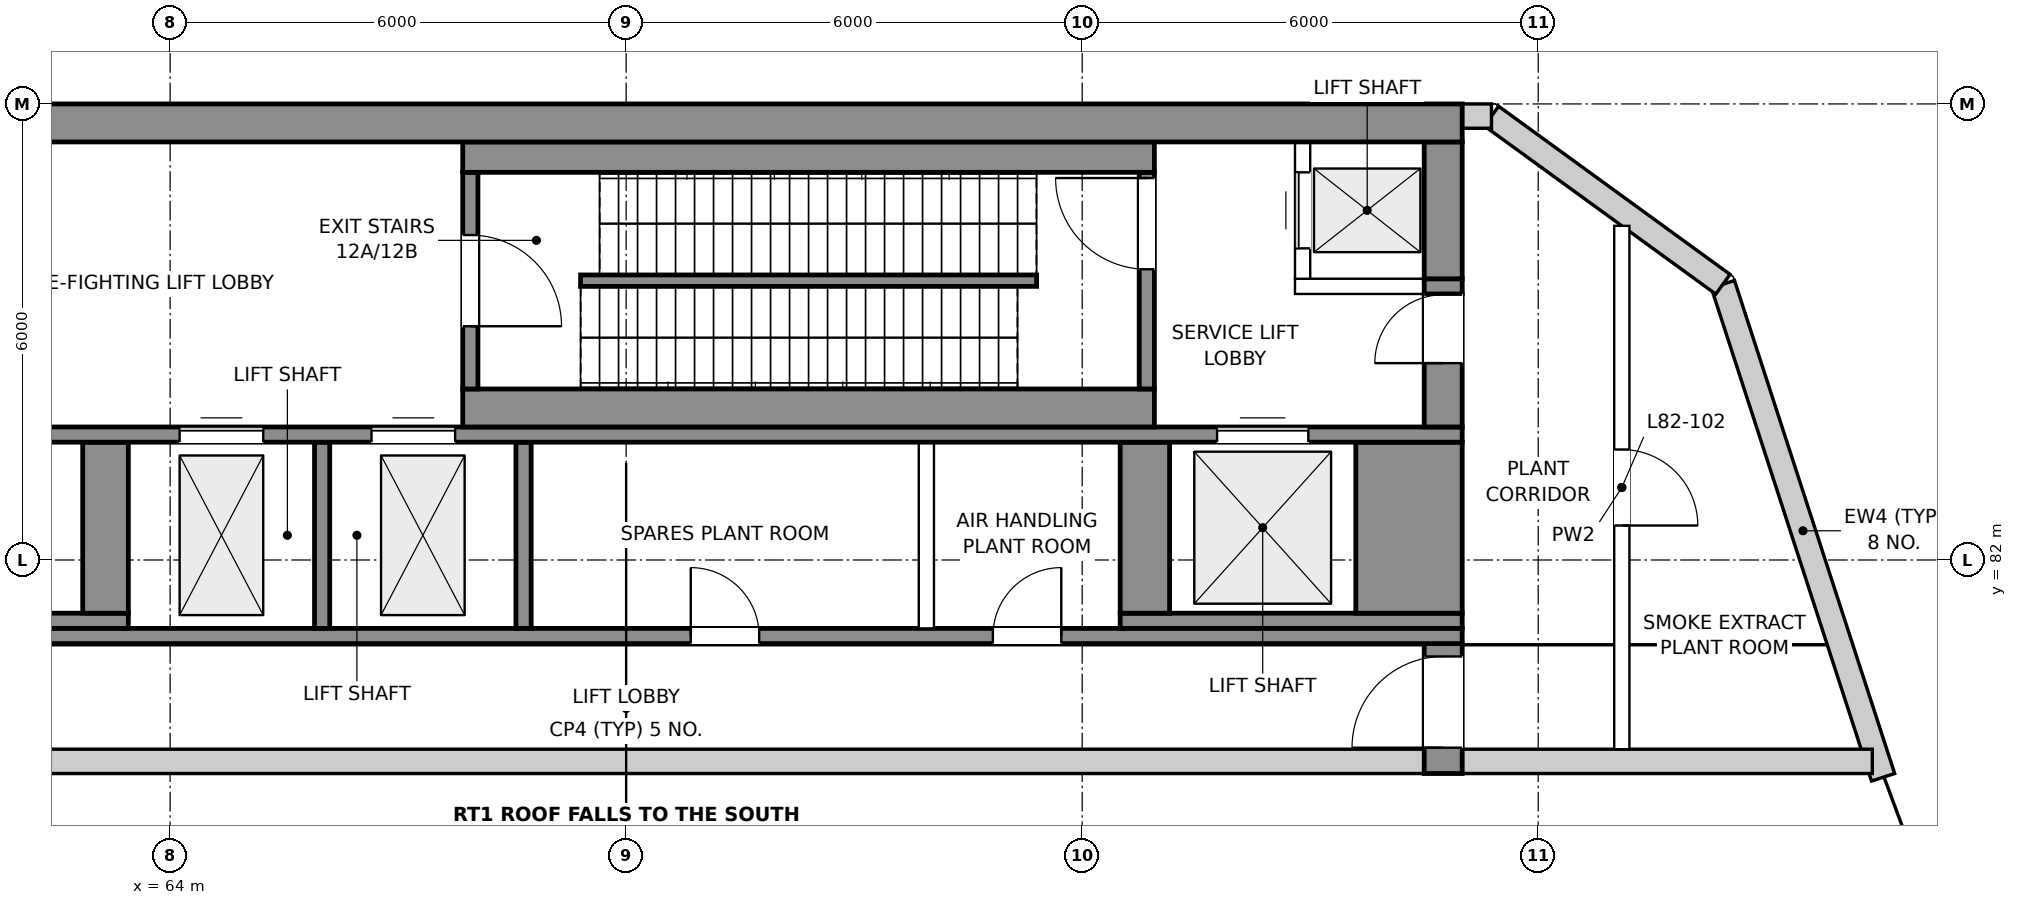
"""IFC4 building model, lengths in metres.
Left out: names, types, materials, properties, quantities, classifications, styles, units other than length and angle.
Written with IfcOpenShell. Run it as: python <this file> out.ifc"""

import sys

from ifc_helpers import new_model, si_unit, direction, frame, frame_2d, origin, place, context, subcontext, project, spatial, polyline, rectangle, outline, extrude, element, fill, save


model = new_model("IFC4")
c1 = context("Model", 3, precision=1e-05, world=origin(), true_north=direction((0.0, 1.0)))
c2 = subcontext(c1, "Body", "Model", "MODEL_VIEW")
j1 = project(units=[si_unit("LENGTHUNIT", "METRE"), si_unit("PLANEANGLEUNIT", "RADIAN")], contexts=[c1])
p1 = place(None, origin())
s1 = spatial("IfcSite", under=j1, at=p1, CompositionType="ELEMENT")
p2 = place(p1, origin())
s2 = spatial("IfcBuilding", under=s1, at=p2, CompositionType="ELEMENT")
p3 = place(p2, frame((0.0, 0.0, 351.2)))
s3 = spatial("IfcBuildingStorey", under=s2, at=p3, CompositionType="ELEMENT", Elevation=351.2)
p4 = place(p3, frame((86.538, 79.141, 0.0), z_axis=(0.0, 0.0, 1.0), x_axis=(-0.309001889909, 0.951061423901, 0.0)))
e1 = element("IfcWall", 1, at=p4, inside=s3, PredefinedType="SOLIDWALL", context=c2, shape_type="SweptSolid", body=[
    extrude(outline(polyline([(0.0, 0.0), (6.82, 0.0), (6.82, 4.2), (1.833, 4.2), (0.0, 2.656), (0.0, 0.0)])), frame((0.0, 0.16, 0.0), z_axis=(0.0, -1.0, 0.0), x_axis=(1.0, 0.0, 0.0)), (0.0, 0.0, 1.0), 0.32),
])
p5 = place(p3, frame((84.43, 85.628, 0.0), z_axis=(0.0, 0.0, 1.0), x_axis=(-0.809022082061, 0.58777824963, 0.0)))
e2 = element("IfcWall", 2, at=p5, inside=s3, PredefinedType="SOLIDWALL", context=c2, shape_type="SweptSolid", body=[
    extrude(rectangle(XDim=3.764, YDim=0.32, at=frame_2d((1.882, 0.0))), origin(), (0.0, 0.0, 1.0), 4.2),
])
p6 = place(p3, frame((81.385, 87.84, 0.0), z_axis=(0.0, 0.0, 1.0), x_axis=(-1.0, 0.0, 0.0)))
e3 = element("IfcWall", 3, at=p6, inside=s3, PredefinedType="SOLIDWALL", context=c2, shape_type="SweptSolid", body=[
    extrude(rectangle(XDim=0.385, YDim=0.32, at=frame_2d((0.192, 0.0))), origin(), (0.0, 0.0, 1.0), 4.2),
])
p7 = place(p3, frame((59.5, 79.351, 0.0), z_axis=(0.0, 0.0, 1.0), x_axis=(1.0, 0.0, 0.0)))
e4 = element("IfcWall", 4, at=p7, inside=s3, PredefinedType="SOLIDWALL", context=c2, shape_type="SweptSolid", body=[
    extrude(rectangle(XDim=21.0, YDim=0.32, at=frame_2d((10.5, 0.0))), origin(), (0.0, 0.0, 1.0), 2.842),
])
p8 = place(p3, frame((81.0, 79.351, 0.0), z_axis=(0.0, 0.0, 1.0), x_axis=(1.0, 0.0, 0.0)))
e5 = element("IfcWall", 5, at=p8, inside=s3, PredefinedType="SOLIDWALL", context=c2, shape_type="SweptSolid", body=[
    extrude(rectangle(XDim=5.396, YDim=0.32, at=frame_2d((2.698, 0.0))), origin(), (0.0, 0.0, 1.0), 2.842),
])
p9 = place(p3, frame((80.75, 79.191, 0.0), z_axis=(0.0, 0.0, 1.0), x_axis=(0.0, 1.0, 0.0)))
e6 = element("IfcWall", 6, at=p9, inside=s3, PredefinedType="SHEAR", context=c2, shape_type="SweptSolid", body=[
    extrude(outline(polyline([(0.0, 0.0), (1.709, 0.0), (1.709, 4.163), (0.0, 2.65), (0.0, 0.0)])), frame((0.0, 0.25, 0.0), z_axis=(0.0, -1.0, 0.0), x_axis=(1.0, 0.0, 0.0)), (0.0, 0.0, 1.0), 0.5),
])
p10 = place(p9, frame((0.34, 0.0, 0.0)))
e7 = element("IfcOpeningElement", 7, at=p10, cuts=e6, PredefinedType="OPENING", context=c2, shape_type="SweptSolid", body=[
    extrude(rectangle(XDim=1.2, YDim=2.1, at=frame_2d((0.6, 1.05))), frame((0.0, 0.26, 0.0), z_axis=(0.0, -1.0, 0.0), x_axis=(1.0, 0.0, 0.0)), (0.0, 0.0, 1.0), 0.52),
])
p11 = place(p3, frame((59.0, 81.0, 0.0), z_axis=(0.0, 0.0, 1.0), x_axis=(1.0, 0.0, 0.0)))
e8 = element("IfcWall", 8, at=p11, inside=s3, PredefinedType="SHEAR", context=c2, shape_type="SweptSolid", body=[
    extrude(rectangle(XDim=22.0, YDim=0.2, at=frame_2d((11.0, 0.0))), origin(), (0.0, 0.0, 1.0), 4.252),
])
p12 = place(p11, frame((11.85, 0.0, 0.0)))
e9 = element("IfcOpeningElement", 9, at=p12, cuts=e8, PredefinedType="OPENING", context=c2, shape_type="SweptSolid", body=[
    extrude(rectangle(XDim=0.9, YDim=2.1, at=frame_2d((0.45, 1.05))), frame((0.0, 0.11, 0.0), z_axis=(0.0, -1.0, 0.0), x_axis=(1.0, 0.0, 0.0)), (0.0, 0.0, 1.0), 0.22),
])
p13 = place(p11, frame((15.825, 0.0, 0.0)))
e10 = element("IfcOpeningElement", 10, at=p13, cuts=e8, PredefinedType="OPENING", context=c2, shape_type="SweptSolid", body=[
    extrude(rectangle(XDim=0.9, YDim=2.1, at=frame_2d((0.45, 1.05))), frame((0.0, 0.11, 0.0), z_axis=(0.0, -1.0, 0.0), x_axis=(1.0, 0.0, 0.0)), (0.0, 0.0, 1.0), 0.22),
])
p14 = place(p3, frame((59.0, 81.2, 0.0), z_axis=(0.0, 0.0, 1.0), x_axis=(1.0, 0.0, 0.0)))
e11 = element("IfcWall", 11, at=p14, inside=s3, PredefinedType="SHEAR", context=c2, shape_type="SweptSolid", body=[
    extrude(rectangle(XDim=4.45, YDim=0.2, at=frame_2d((2.225, 0.0))), origin(), (0.0, 0.0, 1.0), 4.429),
])
for number, where, z_axis, x_axis in (
    (12, (66.0, 81.1, 0.0), (0.0, 0.0, 1.0), (0.0, 1.0, 0.0)),
    (13, (68.65, 81.1, 0.0), (0.0, 0.0, 1.0), (0.0, 1.0, 0.0)),
):
    element("IfcWall", number, at=place(p3, frame(where, z_axis=z_axis, x_axis=x_axis)), inside=s3, PredefinedType="SHEAR", context=c2, shape_type="SweptSolid", body=[
        extrude(outline(polyline([(0.0, 0.0), (2.45, 0.0), (2.45, 4.5), (0.0, 4.341), (0.0, 0.0)])), frame((0.0, 0.1, 0.0), z_axis=(0.0, -1.0, 0.0), x_axis=(1.0, 0.0, 0.0)), (0.0, 0.0, 1.0), 0.2),
    ])
p15 = place(p3, frame((73.95, 81.1, 0.0), z_axis=(0.0, 0.0, 1.0), x_axis=(0.0, 1.0, 0.0)))
e14 = element("IfcWall", 14, at=p15, inside=s3, PredefinedType="PARTITIONING", context=c2, shape_type="SweptSolid", body=[
    extrude(rectangle(XDim=2.45, YDim=0.2, at=frame_2d((1.225, 0.0))), origin(), (0.0, 0.0, 1.0), 4.2),
])
p16 = place(p3, frame((76.5, 81.2, 0.0), z_axis=(0.0, 0.0, 1.0), x_axis=(1.0, 0.0, 0.0)))
e15 = element("IfcWall", 15, at=p16, inside=s3, PredefinedType="SHEAR", context=c2, shape_type="SweptSolid", body=[
    extrude(rectangle(XDim=4.5, YDim=0.2, at=frame_2d((2.25, 0.0))), origin(), (0.0, 0.0, 1.0), 4.429),
])
p17 = place(p3, frame((63.15, 81.3, 0.0), z_axis=(0.0, 0.0, 1.0), x_axis=(0.0, 1.0, 0.0)))
e16 = element("IfcWall", 16, at=p17, inside=s3, PredefinedType="SHEAR", context=c2, shape_type="SweptSolid", body=[
    extrude(rectangle(XDim=2.25, YDim=0.6, at=frame_2d((1.125, 0.0))), origin(), (0.0, 0.0, 1.0), 4.5),
])
p18 = place(p3, frame((76.825, 81.3, 0.0), z_axis=(0.0, 0.0, 1.0), x_axis=(0.0, 1.0, 0.0)))
e17 = element("IfcWall", 17, at=p18, inside=s3, PredefinedType="SHEAR", context=c2, shape_type="SweptSolid", body=[
    extrude(rectangle(XDim=2.25, YDim=0.65, at=frame_2d((1.125, 0.0))), origin(), (0.0, 0.0, 1.0), 4.5),
])
p19 = place(p3, frame((80.3, 81.3, 0.0), z_axis=(0.0, 0.0, 1.0), x_axis=(0.0, 1.0, 0.0)))
e18 = element("IfcWall", 18, at=p19, inside=s3, PredefinedType="SHEAR", context=c2, shape_type="SweptSolid", body=[
    extrude(rectangle(XDim=2.25, YDim=1.4, at=frame_2d((1.125, 0.0))), origin(), (0.0, 0.0, 1.0), 4.5),
])
p20 = place(p3, frame((59.0, 83.65, 0.0), z_axis=(0.0, 0.0, 1.0), x_axis=(1.0, 0.0, 0.0)))
e19 = element("IfcWall", 19, at=p20, inside=s3, PredefinedType="SHEAR", context=c2, shape_type="SweptSolid", body=[
    extrude(rectangle(XDim=22.0, YDim=0.2, at=frame_2d((11.0, 0.0))), origin(), (0.0, 0.0, 1.0), 4.5),
])
p21 = place(p20, frame((5.125, 0.0, 0.0)))
e20 = element("IfcOpeningElement", 20, at=p21, cuts=e19, PredefinedType="OPENING", context=c2, shape_type="SweptSolid", body=[
    extrude(rectangle(XDim=1.1, YDim=2.1, at=frame_2d((0.55, 1.05))), frame((0.0, 0.11, 0.0), z_axis=(0.0, -1.0, 0.0), x_axis=(1.0, 0.0, 0.0)), (0.0, 0.0, 1.0), 0.22),
])
p22 = place(p20, frame((7.65, 0.0, 0.0)))
e21 = element("IfcOpeningElement", 21, at=p22, cuts=e19, PredefinedType="OPENING", context=c2, shape_type="SweptSolid", body=[
    extrude(rectangle(XDim=1.1, YDim=2.1, at=frame_2d((0.55, 1.05))), frame((0.0, 0.11, 0.0), z_axis=(0.0, -1.0, 0.0), x_axis=(1.0, 0.0, 0.0)), (0.0, 0.0, 1.0), 0.22),
])
p23 = place(p20, frame((18.775, 0.0, 0.0)))
e22 = element("IfcOpeningElement", 22, at=p23, cuts=e19, PredefinedType="OPENING", context=c2, shape_type="SweptSolid", body=[
    extrude(rectangle(XDim=1.2, YDim=2.1, at=frame_2d((0.6, 1.05))), frame((0.0, 0.11, 0.0), z_axis=(0.0, -1.0, 0.0), x_axis=(1.0, 0.0, 0.0)), (0.0, 0.0, 1.0), 0.22),
])
p24 = place(p20, frame((2.075, 0.0, 0.0)))
e23 = element("IfcOpeningElement", 23, at=p24, cuts=e19, PredefinedType="OPENING", context=c2, shape_type="SweptSolid", body=[
    extrude(rectangle(XDim=1.1, YDim=2.1, at=frame_2d((0.55, 1.05))), frame((0.0, 0.11, 0.0), z_axis=(0.0, -1.0, 0.0), x_axis=(1.0, 0.0, 0.0)), (0.0, 0.0, 1.0), 0.22),
])
p25 = place(p3, frame((67.85, 84.0, 0.0), z_axis=(0.0, 0.0, 1.0), x_axis=(1.0, 0.0, 0.0)))
e24 = element("IfcWall", 24, at=p25, inside=s3, PredefinedType="SHEAR", context=c2, shape_type="SweptSolid", body=[
    extrude(rectangle(XDim=9.1, YDim=0.5, at=frame_2d((4.55, 0.0))), origin(), (0.0, 0.0, 1.0), 4.5),
])
p26 = place(p3, frame((80.75, 83.75, 0.0), z_axis=(0.0, 0.0, 1.0), x_axis=(0.0, 1.0, 0.0)))
e25 = element("IfcWall", 25, at=p26, inside=s3, PredefinedType="SHEAR", context=c2, shape_type="SweptSolid", body=[
    extrude(rectangle(XDim=1.75, YDim=0.5, at=frame_2d((0.875, 0.0))), origin(), (0.0, 0.0, 1.0), 4.5),
])
p27 = place(p26, frame((0.84, 0.0, 0.0)))
e26 = element("IfcOpeningElement", 26, at=p27, cuts=e25, PredefinedType="OPENING", context=c2, shape_type="SweptSolid", body=[
    extrude(rectangle(XDim=0.9, YDim=2.1, at=frame_2d((0.45, 1.05))), frame((0.0, 0.26, 0.0), z_axis=(0.0, -1.0, 0.0), x_axis=(1.0, 0.0, 0.0)), (0.0, 0.0, 1.0), 0.52),
])
p28 = place(p3, frame((67.95, 84.25, 0.0), z_axis=(0.0, 0.0, 1.0), x_axis=(0.0, 1.0, 0.0)))
e27 = element("IfcWall", 27, at=p28, inside=s3, PredefinedType="SHEAR", context=c2, shape_type="SweptSolid", body=[
    extrude(rectangle(XDim=2.85, YDim=0.2, at=frame_2d((1.425, 0.0))), origin(), (0.0, 0.0, 1.0), 4.5),
])
p29 = place(p28, frame((0.825, 0.0, 0.0)))
e28 = element("IfcOpeningElement", 28, at=p29, cuts=e27, PredefinedType="OPENING", context=c2, shape_type="SweptSolid", body=[
    extrude(rectangle(XDim=1.2, YDim=2.1, at=frame_2d((0.6, 1.05))), frame((0.0, 0.11, 0.0), z_axis=(0.0, -1.0, 0.0), x_axis=(1.0, 0.0, 0.0)), (0.0, 0.0, 1.0), 0.22),
])
p30 = place(p3, frame((76.85, 84.25, 0.0), z_axis=(0.0, 0.0, 1.0), x_axis=(0.0, 1.0, 0.0)))
e29 = element("IfcWall", 29, at=p30, inside=s3, PredefinedType="SHEAR", context=c2, shape_type="SweptSolid", body=[
    extrude(rectangle(XDim=2.85, YDim=0.2, at=frame_2d((1.425, 0.0))), origin(), (0.0, 0.0, 1.0), 4.5),
])
p31 = place(p30, frame((1.575, 0.0, 0.0)))
e30 = element("IfcOpeningElement", 30, at=p31, cuts=e29, PredefinedType="OPENING", context=c2, shape_type="SweptSolid", body=[
    extrude(rectangle(XDim=1.2, YDim=2.1, at=frame_2d((0.6, 1.05))), frame((0.0, 0.11, 0.0), z_axis=(0.0, -1.0, 0.0), x_axis=(1.0, 0.0, 0.0)), (0.0, 0.0, 1.0), 0.22),
])
p32 = place(p3, frame((78.8, 85.6, 0.0), z_axis=(0.0, 0.0, 1.0), x_axis=(1.0, 0.0, 0.0)))
e31 = element("IfcWall", 31, at=p32, inside=s3, PredefinedType="PARTITIONING", context=c2, shape_type="SweptSolid", body=[
    extrude(rectangle(XDim=1.7, YDim=0.2, at=frame_2d((0.85, 0.0))), origin(), (0.0, 0.0, 1.0), 4.2),
])
p33 = place(p3, frame((80.5, 85.6, 0.0), z_axis=(0.0, 0.0, 1.0), x_axis=(1.0, 0.0, 0.0)))
e32 = element("IfcWall", 32, at=p33, inside=s3, PredefinedType="SHEAR", context=c2, shape_type="SweptSolid", body=[
    extrude(rectangle(XDim=0.5, YDim=0.2, at=frame_2d((0.25, 0.0))), origin(), (0.0, 0.0, 1.0), 4.5),
])
p34 = place(p3, frame((78.9, 85.7, 0.0), z_axis=(0.0, 0.0, 1.0), x_axis=(0.0, 1.0, 0.0)))
e33 = element("IfcWall", 33, at=p34, inside=s3, PredefinedType="PARTITIONING", context=c2, shape_type="SweptSolid", body=[
    extrude(rectangle(XDim=1.8, YDim=0.2, at=frame_2d((0.9, 0.0))), origin(), (0.0, 0.0, 1.0), 4.2),
])
p35 = place(p34, frame((0.4, 0.0, 0.0)))
e34 = element("IfcOpeningElement", 34, at=p35, cuts=e33, PredefinedType="OPENING", context=c2, shape_type="SweptSolid", body=[
    extrude(rectangle(XDim=1.0, YDim=2.1, at=frame_2d((0.5, 1.05))), frame((0.0, 0.11, 0.0), z_axis=(0.0, -1.0, 0.0), x_axis=(1.0, 0.0, 0.0)), (0.0, 0.0, 1.0), 0.22),
])
p36 = place(p3, frame((80.75, 85.7, 0.0), z_axis=(0.0, 0.0, 1.0), x_axis=(0.0, 1.0, 0.0)))
e35 = element("IfcWall", 35, at=p36, inside=s3, PredefinedType="SHEAR", context=c2, shape_type="SweptSolid", body=[
    extrude(rectangle(XDim=1.8, YDim=0.5, at=frame_2d((0.9, 0.0))), origin(), (0.0, 0.0, 1.0), 4.5),
])
p37 = place(p3, frame((67.85, 87.3, 0.0), z_axis=(0.0, 0.0, 1.0), x_axis=(1.0, 0.0, 0.0)))
e36 = element("IfcWall", 36, at=p37, inside=s3, PredefinedType="SHEAR", context=c2, shape_type="SweptSolid", body=[
    extrude(rectangle(XDim=9.1, YDim=0.4, at=frame_2d((4.55, 0.0))), origin(), (0.0, 0.0, 1.0), 4.5),
])
p38 = place(p3, frame((59.0, 87.75, 0.0), z_axis=(0.0, 0.0, 1.0), x_axis=(1.0, 0.0, 0.0)))
e37 = element("IfcWall", 37, at=p38, inside=s3, PredefinedType="SHEAR", context=c2, shape_type="SweptSolid", body=[
    extrude(rectangle(XDim=22.0, YDim=0.5, at=frame_2d((11.0, 0.0))), origin(), (0.0, 0.0, 1.0), 4.5),
])
p39 = place(p3, frame((69.4, 85.675, 0.0), z_axis=(0.0, 0.0, 1.0), x_axis=(1.0, 0.0, 0.0)))
e38 = element("IfcWall", 38, at=p39, inside=s3, PredefinedType="SHEAR", context=c2, shape_type="SweptSolid", body=[
    extrude(rectangle(XDim=6.0, YDim=0.15, at=frame_2d((3.0, 0.0))), origin(), (0.0, 0.0, 1.0), 4.5),
])
p40 = place(p3, frame((83.1, 86.396, 0.0), z_axis=(0.0, 0.0, 1.0), x_axis=(0.0, -1.0, 0.0)))
e39 = element("IfcWall", 39, at=p40, inside=s3, PredefinedType="PARTITIONING", context=c2, shape_type="SweptSolid", body=[
    extrude(outline(polyline([(0.0, 0.0), (6.885, 0.0), (6.885, 2.833), (0.0, 3.75), (0.0, 0.0)])), frame((0.0, 0.1, 0.0), z_axis=(0.0, -1.0, 0.0), x_axis=(1.0, 0.0, 0.0)), (0.0, 0.0, 1.0), 0.2),
])
p41 = place(p40, frame((2.943, 0.0, 0.0)))
e40 = element("IfcOpeningElement", 40, at=p41, cuts=e39, PredefinedType="OPENING", context=c2, shape_type="SweptSolid", body=[
    extrude(rectangle(XDim=1.0, YDim=2.1, at=frame_2d((0.5, 1.05))), frame((0.0, 0.11, 0.0), z_axis=(0.0, -1.0, 0.0), x_axis=(1.0, 0.0, 0.0)), (0.0, 0.0, 1.0), 0.22),
])
p42 = place(p29, frame((1.2, 0.0, 0.0), z_axis=(0.0, 0.0, 1.0), x_axis=(-1.0, 0.0, 0.0)))
e41 = element("IfcDoor", 41, at=p42, inside=s3, OperationType="SINGLE_SWING_RIGHT", PredefinedType="DOOR", context=c2, shape_type="SweptSolid", body=[
    extrude(rectangle(XDim=1.2, YDim=2.1, at=frame_2d((0.6, 1.05))), frame((0.0, 0.025, 0.0), z_axis=(0.0, -1.0, 0.0), x_axis=(1.0, 0.0, 0.0)), (0.0, 0.0, 1.0), 0.05),
])
fill(e28, e41)
p43 = place(p31, origin())
e42 = element("IfcDoor", 42, at=p43, inside=s3, OperationType="SINGLE_SWING_RIGHT", PredefinedType="DOOR", context=c2, shape_type="SweptSolid", body=[
    extrude(rectangle(XDim=1.2, YDim=2.1, at=frame_2d((0.6, 1.05))), frame((0.0, 0.025, 0.0), z_axis=(0.0, -1.0, 0.0), x_axis=(1.0, 0.0, 0.0)), (0.0, 0.0, 1.0), 0.05),
])
fill(e30, e42)
p44 = place(p10, origin())
e43 = element("IfcDoor", 43, at=p44, inside=s3, OperationType="SINGLE_SWING_LEFT", PredefinedType="DOOR", context=c2, shape_type="SweptSolid", body=[
    extrude(rectangle(XDim=1.2, YDim=2.1, at=frame_2d((0.6, 1.05))), frame((0.0, 0.025, 0.0), z_axis=(0.0, -1.0, 0.0), x_axis=(1.0, 0.0, 0.0)), (0.0, 0.0, 1.0), 0.05),
])
fill(e7, e43)
p45 = place(p27, origin())
e44 = element("IfcDoor", 44, at=p45, inside=s3, OperationType="SINGLE_SWING_LEFT", PredefinedType="DOOR", context=c2, shape_type="SweptSolid", body=[
    extrude(rectangle(XDim=0.9, YDim=2.1, at=frame_2d((0.45, 1.05))), frame((0.0, 0.025, 0.0), z_axis=(0.0, -1.0, 0.0), x_axis=(1.0, 0.0, 0.0)), (0.0, 0.0, 1.0), 0.05),
])
fill(e26, e44)
p46 = place(p21, origin())
e45 = element("IfcDoor", 45, at=p46, inside=s3, OperationType="DOUBLE_DOOR_SLIDING", PredefinedType="DOOR", context=c2, shape_type="SweptSolid", body=[
    extrude(rectangle(XDim=1.1, YDim=2.1, at=frame_2d((0.55, 1.05))), frame((0.0, 0.025, 0.0), z_axis=(0.0, -1.0, 0.0), x_axis=(1.0, 0.0, 0.0)), (0.0, 0.0, 1.0), 0.05),
])
fill(e20, e45)
p47 = place(p22, origin())
e46 = element("IfcDoor", 46, at=p47, inside=s3, OperationType="DOUBLE_DOOR_SLIDING", PredefinedType="DOOR", context=c2, shape_type="SweptSolid", body=[
    extrude(rectangle(XDim=1.1, YDim=2.1, at=frame_2d((0.55, 1.05))), frame((0.0, 0.025, 0.0), z_axis=(0.0, -1.0, 0.0), x_axis=(1.0, 0.0, 0.0)), (0.0, 0.0, 1.0), 0.05),
])
fill(e21, e46)
p48 = place(p23, origin())
e47 = element("IfcDoor", 47, at=p48, inside=s3, OperationType="DOUBLE_DOOR_SLIDING", PredefinedType="DOOR", context=c2, shape_type="SweptSolid", body=[
    extrude(rectangle(XDim=1.2, YDim=2.1, at=frame_2d((0.6, 1.05))), frame((0.0, 0.025, 0.0), z_axis=(0.0, -1.0, 0.0), x_axis=(1.0, 0.0, 0.0)), (0.0, 0.0, 1.0), 0.05),
])
fill(e22, e47)
p49 = place(p35, origin())
e48 = element("IfcDoor", 48, at=p49, inside=s3, OperationType="DOUBLE_DOOR_SLIDING", PredefinedType="DOOR", context=c2, shape_type="SweptSolid", body=[
    extrude(rectangle(XDim=1.0, YDim=2.1, at=frame_2d((0.5, 1.05))), frame((0.0, 0.025, 0.0), z_axis=(0.0, -1.0, 0.0), x_axis=(1.0, 0.0, 0.0)), (0.0, 0.0, 1.0), 0.05),
])
fill(e34, e48)
p50 = place(p12, origin())
e49 = element("IfcDoor", 49, at=p50, inside=s3, OperationType="SINGLE_SWING_LEFT", PredefinedType="DOOR", context=c2, shape_type="SweptSolid", body=[
    extrude(rectangle(XDim=0.9, YDim=2.1, at=frame_2d((0.45, 1.05))), frame((0.0, 0.025, 0.0), z_axis=(0.0, -1.0, 0.0), x_axis=(1.0, 0.0, 0.0)), (0.0, 0.0, 1.0), 0.05),
])
fill(e9, e49)
p51 = place(p13, origin())
e50 = element("IfcDoor", 50, at=p51, inside=s3, OperationType="SINGLE_SWING_RIGHT", PredefinedType="DOOR", context=c2, shape_type="SweptSolid", body=[
    extrude(rectangle(XDim=0.9, YDim=2.1, at=frame_2d((0.45, 1.05))), frame((0.0, 0.025, 0.0), z_axis=(0.0, -1.0, 0.0), x_axis=(1.0, 0.0, 0.0)), (0.0, 0.0, 1.0), 0.05),
])
fill(e10, e50)
p52 = place(p41, origin())
e51 = element("IfcDoor", 51, at=p52, inside=s3, OperationType="SINGLE_SWING_RIGHT", PredefinedType="DOOR", context=c2, shape_type="SweptSolid", body=[
    extrude(rectangle(XDim=1.0, YDim=2.1, at=frame_2d((0.5, 1.05))), frame((0.0, 0.025, 0.0), z_axis=(0.0, -1.0, 0.0), x_axis=(1.0, 0.0, 0.0)), (0.0, 0.0, 1.0), 0.05),
])
fill(e40, e51)
save(model, sys.argv[1])
